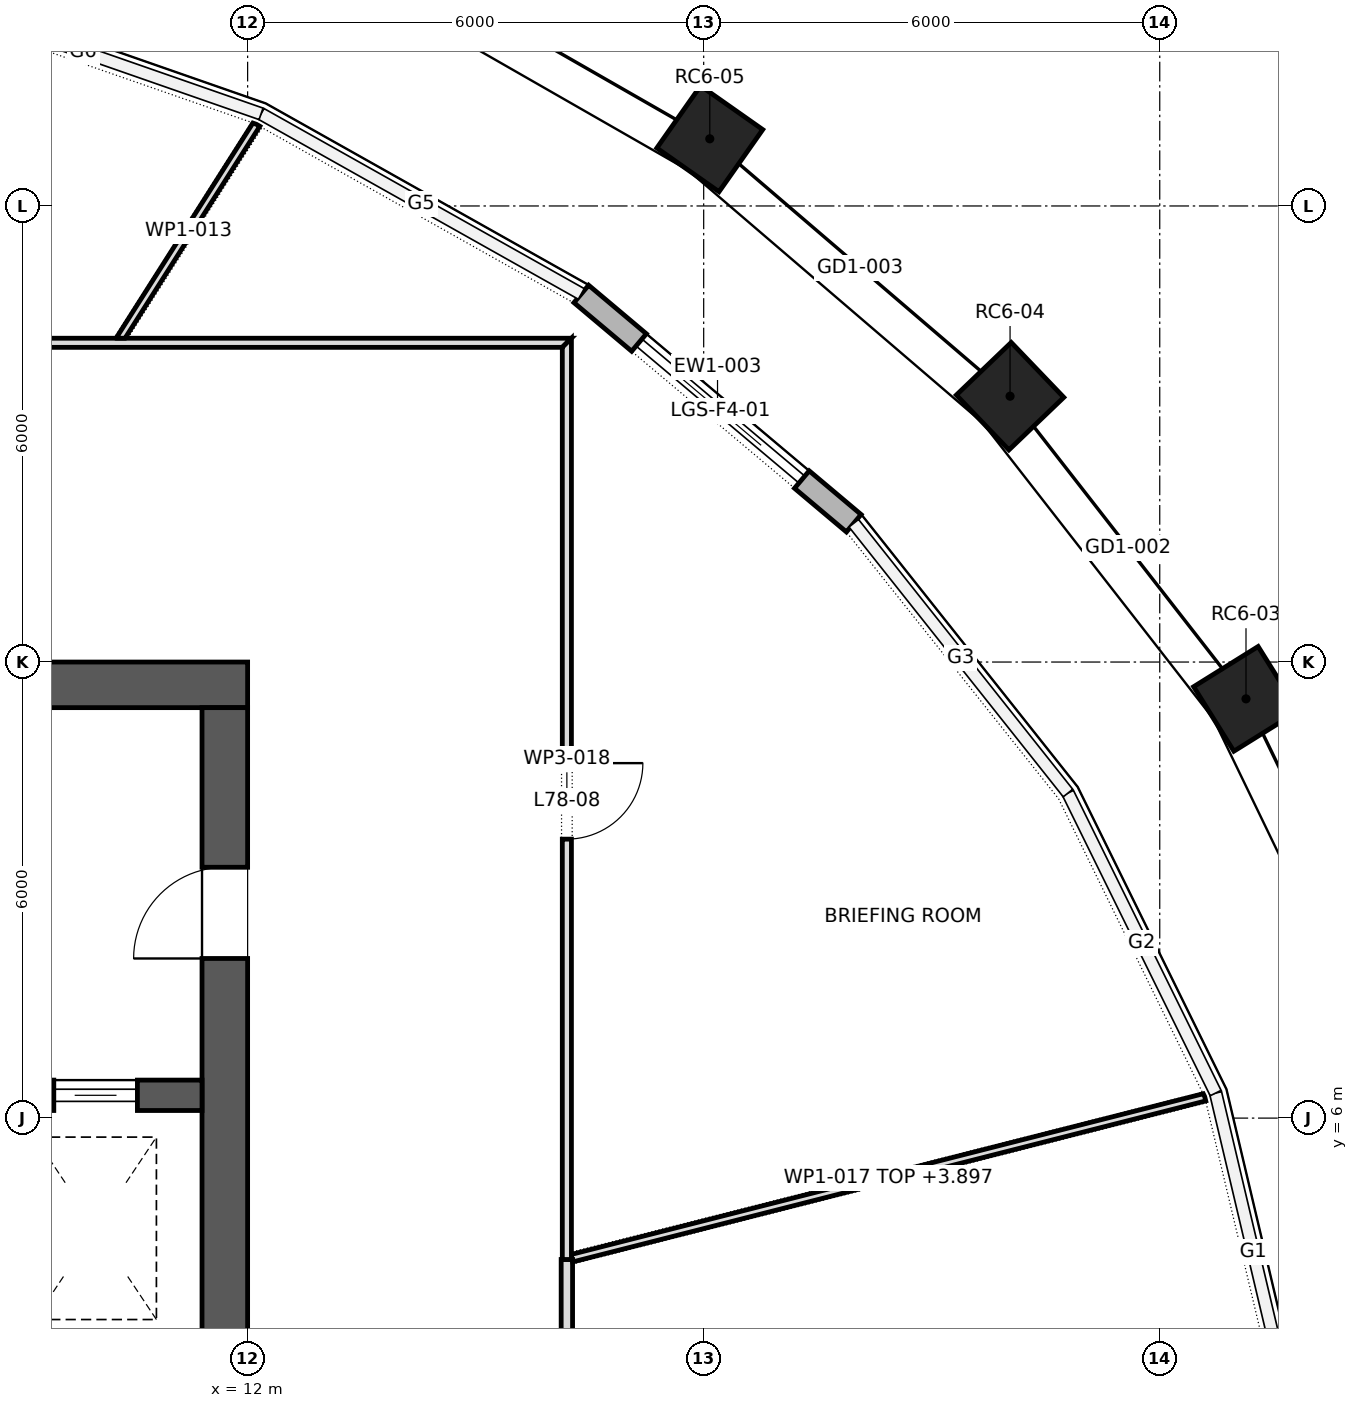
"""IFC4 building model, lengths in metres.
Left out: names, types, materials, properties, quantities, classifications, styles, units other than length and angle.
Written with IfcOpenShell. Run it as: python <this file> out.ifc"""

import sys

from ifc_helpers import new_model, si_unit, direction, frame, frame_2d, origin, origin_2d, place, context, subcontext, project, spatial, polyline, rectangle, outline, extrude, element, fill, save


model = new_model("IFC4")
c1 = context("Model", 3, precision=1e-05, world=origin(), true_north=direction((0.0, 1.0)))
c2 = subcontext(c1, "Body", "Model", "MODEL_VIEW")
j1 = project(units=[si_unit("LENGTHUNIT", "METRE"), si_unit("PLANEANGLEUNIT", "RADIAN")], contexts=[c1])
p1 = place(None, origin())
s1 = spatial("IfcSite", under=j1, at=p1, CompositionType="ELEMENT")
p2 = place(p1, origin())
s2 = spatial("IfcBuilding", under=s1, at=p2, CompositionType="ELEMENT")
p3 = place(p2, frame((0.0, 0.0, 333.3)))
s3 = spatial("IfcBuildingStorey", under=s2, at=p3, CompositionType="ELEMENT", Elevation=333.3)
for number, where, z_axis, x_axis in (
    (1, (25.135, 11.516, 0.0), (0.0, 0.0, 1.0), (-0.529, 0.849, 0.0)),
    (2, (22.031, 15.497, 0.0), (0.0, 0.0, 1.0), (-0.692, 0.722, 0.0)),
    (3, (18.08, 18.884, 0.0), (0.0, 0.0, 1.0), (-0.818, 0.575, 0.0)),
):
    element("IfcColumn", number, at=place(p3, frame(where, z_axis=z_axis, x_axis=x_axis)), inside=s3, PredefinedType="COLUMN", context=c2, shape_type="SweptSolid", body=[
        extrude(rectangle(XDim=1.0, YDim=1.0, at=origin_2d()), origin(), (0.0, 0.0, 1.0), 5.0),
    ])
p4 = place(p3, frame((-12.0, 11.7, 0.0), z_axis=(0.0, 0.0, 1.0), x_axis=(1.0, 0.0, 0.0)))
e4 = element("IfcWall", 4, at=p4, inside=s3, PredefinedType="SHEAR", context=c2, shape_type="SweptSolid", body=[
    extrude(rectangle(XDim=24.0, YDim=0.6, at=frame_2d((12.0, 0.0))), origin(), (0.0, 0.0, 1.0), 5.0),
])
p5 = place(p4, frame((9.025, 0.0, 0.0)))
e5 = element("IfcOpeningElement", 5, at=p5, cuts=e4, PredefinedType="OPENING", context=c2, shape_type="SweptSolid", body=[
    extrude(rectangle(XDim=0.9, YDim=2.1, at=frame_2d((0.45, 1.05))), frame((0.0, 0.312, 0.0), z_axis=(0.0, -1.0, 0.0), x_axis=(1.0, 0.0, 0.0)), (0.0, 0.0, 1.0), 0.624),
])
p6 = place(p4, frame((10.675, 0.0, 0.0)))
e6 = element("IfcOpeningElement", 6, at=p6, cuts=e4, PredefinedType="OPENING", context=c2, shape_type="SweptSolid", body=[
    extrude(rectangle(XDim=0.9, YDim=2.1, at=frame_2d((0.45, 1.05))), frame((0.0, 0.312, 0.0), z_axis=(0.0, -1.0, 0.0), x_axis=(1.0, 0.0, 0.0)), (0.0, 0.0, 1.0), 0.624),
])
p7 = place(p4, frame((4.6, 0.0, 0.0)))
e7 = element("IfcOpeningElement", 7, at=p7, cuts=e4, PredefinedType="OPENING", context=c2, shape_type="SweptSolid", body=[
    extrude(rectangle(XDim=0.8, YDim=2.1, at=frame_2d((0.4, 1.05))), frame((0.0, 0.312, 0.0), z_axis=(0.0, -1.0, 0.0), x_axis=(1.0, 0.0, 0.0)), (0.0, 0.0, 1.0), 0.624),
])
p8 = place(p4, frame((7.0, 0.0, 0.0)))
e8 = element("IfcOpeningElement", 8, at=p8, cuts=e4, PredefinedType="OPENING", context=c2, shape_type="SweptSolid", body=[
    extrude(rectangle(XDim=0.8, YDim=2.1, at=frame_2d((0.4, 1.05))), frame((0.0, 0.312, 0.0), z_axis=(0.0, -1.0, 0.0), x_axis=(1.0, 0.0, 0.0)), (0.0, 0.0, 1.0), 0.624),
])
p9 = place(p4, frame((15.85, 0.0, 0.0)))
e9 = element("IfcOpeningElement", 9, at=p9, cuts=e4, PredefinedType="OPENING", context=c2, shape_type="SweptSolid", body=[
    extrude(rectangle(XDim=0.8, YDim=2.1, at=frame_2d((0.4, 1.05))), frame((0.0, 0.312, 0.0), z_axis=(0.0, -1.0, 0.0), x_axis=(1.0, 0.0, 0.0)), (0.0, 0.0, 1.0), 0.624),
])
p10 = place(p3, frame((11.7, -11.4, 0.0), z_axis=(0.0, 0.0, 1.0), x_axis=(0.0, 1.0, 0.0)))
e10 = element("IfcWall", 10, at=p10, inside=s3, PredefinedType="SHEAR", context=c2, shape_type="SweptSolid", body=[
    extrude(rectangle(XDim=22.8, YDim=0.6, at=frame_2d((11.4, 0.0))), origin(), (0.0, 0.0, 1.0), 5.0),
])
p11 = place(p10, frame((10.2, 0.0, 0.0)))
e11 = element("IfcOpeningElement", 11, at=p11, cuts=e10, PredefinedType="OPENING", context=c2, shape_type="SweptSolid", body=[
    extrude(rectangle(XDim=2.4, YDim=2.1, at=frame_2d((1.2, 1.05))), frame((0.0, 0.312, 0.0), z_axis=(0.0, -1.0, 0.0), x_axis=(1.0, 0.0, 0.0)), (0.0, 0.0, 1.0), 0.624),
])
p12 = place(p10, frame((19.5, 0.0, 0.0)))
e12 = element("IfcOpeningElement", 12, at=p12, cuts=e10, PredefinedType="OPENING", context=c2, shape_type="SweptSolid", body=[
    extrude(rectangle(XDim=1.2, YDim=2.1, at=frame_2d((0.6, 1.05))), frame((0.0, 0.312, 0.0), z_axis=(0.0, -1.0, 0.0), x_axis=(1.0, 0.0, 0.0)), (0.0, 0.0, 1.0), 0.624),
])
p13 = place(p10, frame((2.1, 0.0, 0.0)))
e13 = element("IfcOpeningElement", 13, at=p13, cuts=e10, PredefinedType="OPENING", context=c2, shape_type="SweptSolid", body=[
    extrude(rectangle(XDim=1.2, YDim=2.1, at=frame_2d((0.6, 1.05))), frame((0.0, 0.312, 0.0), z_axis=(0.0, -1.0, 0.0), x_axis=(1.0, 0.0, 0.0)), (0.0, 0.0, 1.0), 0.624),
])
p14 = place(p3, frame((-11.4, 6.3, 0.0), z_axis=(0.0, 0.0, 1.0), x_axis=(1.0, 0.0, 0.0)))
e14 = element("IfcWall", 14, at=p14, inside=s3, PredefinedType="SHEAR", context=c2, shape_type="SweptSolid", body=[
    extrude(rectangle(XDim=22.8, YDim=0.4, at=frame_2d((11.4, 0.0))), origin(), (0.0, 0.0, 1.0), 5.0),
])
p15 = place(p14, frame((20.85, 0.0, 0.0)))
e15 = element("IfcOpeningElement", 15, at=p15, cuts=e14, PredefinedType="OPENING", context=c2, shape_type="SweptSolid", body=[
    extrude(rectangle(XDim=1.1, YDim=2.1, at=frame_2d((0.55, 1.05))), frame((0.0, 0.212, 0.0), z_axis=(0.0, -1.0, 0.0), x_axis=(1.0, 0.0, 0.0)), (0.0, 0.0, 1.0), 0.424),
])
p16 = place(p3, frame((19.975, 13.826, 0.0), z_axis=(0.0, 0.0, 1.0), x_axis=(-0.765128700347, 0.643877373344, 0.0)))
e16 = element("IfcWall", 16, at=p16, inside=s3, PredefinedType="STANDARD", context=c2, shape_type="SweptSolid", body=[
    extrude(outline(polyline([(0.0, -0.15), (4.686, -0.15), (4.686, 0.15), (0.0, 0.15), (0.0, -0.15)])), origin(), (0.0, 0.0, 1.0), 4.65),
])
p17 = place(p16, frame((0.893, 0.0, 0.0)))
e17 = element("IfcOpeningElement", 17, at=p17, cuts=e16, PredefinedType="OPENING", context=c2, shape_type="SweptSolid", body=[
    extrude(rectangle(XDim=2.8, YDim=4.2, at=frame_2d((1.4, 2.1))), frame((0.0, 0.162, 0.0), z_axis=(0.0, -1.0, 0.0), x_axis=(1.0, 0.0, 0.0)), (0.0, 0.0, 1.0), 0.324),
])
p18 = place(p3, frame((-1.9, 16.2, 0.0), z_axis=(0.0, 0.0, 1.0), x_axis=(1.0, 0.0, 0.0)))
e18 = element("IfcWall", 18, at=p18, inside=s3, PredefinedType="PARTITIONING", context=c2, shape_type="SweptSolid", body=[
    extrude(outline(polyline([(0.0, -0.06), (1.804, -0.06), (3.608, -0.06), (5.412, -0.06), (7.216, -0.06), (9.02, -0.06), (10.824, -0.06), (12.628, -0.06), (14.432, -0.06), (16.236, -0.06), (18.04, -0.06), (18.16, 0.06), (16.344, 0.06), (14.528, 0.06), (12.712, 0.06), (10.896, 0.06), (9.08, 0.06), (7.264, 0.06), (5.448, 0.06), (3.632, 0.06), (1.816, 0.06), (0.0, 0.06), (0.0, -0.06)])), origin(), (0.0, 0.0, 1.0), 4.65),
])
p19 = place(p18, frame((5.595, 0.0, 0.0)))
e19 = element("IfcOpeningElement", 19, at=p19, cuts=e18, PredefinedType="OPENING", context=c2, shape_type="SweptSolid", body=[
    extrude(rectangle(XDim=1.0, YDim=2.1, at=frame_2d((0.5, 1.05))), frame((0.0, 0.072, 0.0), z_axis=(0.0, -1.0, 0.0), x_axis=(1.0, 0.0, 0.0)), (0.0, 0.0, 1.0), 0.144),
])
p20 = place(p3, frame((10.311, 16.233, 0.0), z_axis=(0.0, 0.0, 1.0), x_axis=(0.53653775198, 0.843876318367, 0.0)))
e20 = element("IfcWall", 20, at=p20, inside=s3, PredefinedType="PARTITIONING", context=c2, shape_type="SweptSolid", body=[
    extrude(outline(polyline([(3.368, -0.05), (3.368, -0.049), (3.365, 0.002), (3.354, 0.05), (1.677, 0.05), (0.0, 0.05), (0.0, 0.05), (0.063, -0.05), (1.716, -0.05), (3.368, -0.05)])), origin(), (0.0, 0.0, 1.0), 4.65),
])
p21 = place(p3, frame((16.2, -16.275, 0.0), z_axis=(0.0, 0.0, 1.0), x_axis=(0.0, 1.0, 0.0)))
e21 = element("IfcWall", 21, at=p21, inside=s3, PredefinedType="PARTITIONING", context=c2, shape_type="SweptSolid", body=[
    extrude(outline(polyline([(20.415, 0.075), (18.573, 0.075), (16.73, 0.075), (14.888, 0.075), (13.046, 0.075), (11.203, 0.075), (9.361, 0.075), (7.519, 0.075), (5.677, 0.075), (3.834, 0.075), (1.992, 0.075), (0.15, 0.075), (0.0, -0.075), (1.856, -0.075), (3.712, -0.075), (5.568, -0.075), (7.424, -0.075), (9.28, -0.075), (11.135, -0.075), (12.991, -0.075), (14.847, -0.075), (16.703, -0.075), (18.559, -0.075), (20.415, -0.075), (20.415, 0.075)])), origin(), (0.0, 0.0, 1.0), 4.65),
])
p22 = place(p21, frame((5.605, 0.0, 0.0)))
e22 = element("IfcOpeningElement", 22, at=p22, cuts=e21, PredefinedType="OPENING", context=c2, shape_type="SweptSolid", body=[
    extrude(rectangle(XDim=1.0, YDim=2.1, at=frame_2d((0.5, 1.05))), frame((0.0, 0.087, 0.0), z_axis=(0.0, -1.0, 0.0), x_axis=(1.0, 0.0, 0.0)), (0.0, 0.0, 1.0), 0.174),
])
p23 = place(p21, frame((15.775, 0.0, 0.0)))
e23 = element("IfcOpeningElement", 23, at=p23, cuts=e21, PredefinedType="OPENING", context=c2, shape_type="SweptSolid", body=[
    extrude(rectangle(XDim=1.0, YDim=2.1, at=frame_2d((0.5, 1.05))), frame((0.0, 0.087, 0.0), z_axis=(0.0, -1.0, 0.0), x_axis=(1.0, 0.0, 0.0)), (0.0, 0.0, 1.0), 0.174),
])
p24 = place(p3, frame((16.263, 4.156, 0.0), z_axis=(0.0, 0.0, 1.0), x_axis=(0.969153814145, 0.246456658519, 0.0)))
e24 = element("IfcWall", 24, at=p24, inside=s3, PredefinedType="PARTITIONING", context=c2, shape_type="SweptSolid", body=[
    extrude(outline(polyline([(8.595, -0.05), (8.595, 0.009), (8.587, 0.05), (6.871, 0.05), (5.156, 0.05), (3.441, 0.05), (1.725, 0.05), (0.01, 0.05), (0.0, 0.012), (0.0, -0.017), (0.008, -0.019), (0.0, -0.049), (0.0, -0.05), (1.719, -0.05), (3.438, -0.05), (5.157, -0.05), (6.876, -0.05), (8.595, -0.05)])), origin(), (0.0, 0.0, 1.0), 3.897),
])
p25 = place(p3, frame((16.2, 16.26, 0.0), z_axis=(0.0, 0.0, 1.0), x_axis=(0.0, -1.0, 0.0)))
e25 = element("IfcWall", 25, at=p25, inside=s3, PredefinedType="PARTITIONING", context=c2, shape_type="SweptSolid", body=[
    extrude(outline(polyline([(12.12, 0.06), (10.389, 0.06), (8.657, 0.06), (6.926, 0.06), (5.194, 0.06), (3.463, 0.06), (1.731, 0.06), (0.0, 0.06), (0.12, -0.06), (1.834, -0.06), (3.549, -0.06), (5.263, -0.06), (6.977, -0.06), (8.692, -0.06), (10.406, -0.06), (12.12, -0.06), (12.12, 0.06)])), origin(), (0.0, 0.0, 1.0), 4.65),
])
p26 = place(p25, frame((5.59, 0.0, 0.0)))
e26 = element("IfcOpeningElement", 26, at=p26, cuts=e25, PredefinedType="OPENING", context=c2, shape_type="SweptSolid", body=[
    extrude(rectangle(XDim=1.0, YDim=2.1, at=frame_2d((0.5, 1.05))), frame((0.0, 0.072, 0.0), z_axis=(0.0, -1.0, 0.0), x_axis=(1.0, 0.0, 0.0)), (0.0, 0.0, 1.0), 0.144),
])
p27 = place(p17, origin())
e27 = element("IfcDoor", 27, at=p27, inside=s3, OperationType="DOUBLE_DOOR_SLIDING", PredefinedType="DOOR", context=c2, shape_type="SweptSolid", body=[
    extrude(rectangle(XDim=2.8, YDim=4.2, at=frame_2d((1.4, 2.1))), frame((0.0, 0.025, 0.0), z_axis=(0.0, -1.0, 0.0), x_axis=(1.0, 0.0, 0.0)), (0.0, 0.0, 1.0), 0.05),
])
fill(e17, e27)
p28 = place(p15, origin())
e28 = element("IfcDoor", 28, at=p28, inside=s3, OperationType="SLIDING_TO_LEFT", PredefinedType="DOOR", context=c2, shape_type="SweptSolid", body=[
    extrude(rectangle(XDim=1.1, YDim=2.1, at=frame_2d((0.55, 1.05))), frame((0.0, 0.025, 0.0), z_axis=(0.0, -1.0, 0.0), x_axis=(1.0, 0.0, 0.0)), (0.0, 0.0, 1.0), 0.05),
])
fill(e15, e28)
p29 = place(p12, origin())
e29 = element("IfcDoor", 29, at=p29, inside=s3, OperationType="SINGLE_SWING_RIGHT", PredefinedType="DOOR", context=c2, shape_type="SweptSolid", body=[
    extrude(rectangle(XDim=1.2, YDim=2.1, at=frame_2d((0.6, 1.05))), frame((0.0, 0.025, 0.0), z_axis=(0.0, -1.0, 0.0), x_axis=(1.0, 0.0, 0.0)), (0.0, 0.0, 1.0), 0.05),
])
fill(e12, e29)
p30 = place(p26, origin())
e30 = element("IfcDoor", 30, at=p30, inside=s3, OperationType="SINGLE_SWING_RIGHT", PredefinedType="DOOR", context=c2, shape_type="SweptSolid", body=[
    extrude(rectangle(XDim=1.0, YDim=2.1, at=frame_2d((0.5, 1.05))), frame((0.0, 0.025, 0.0), z_axis=(0.0, -1.0, 0.0), x_axis=(1.0, 0.0, 0.0)), (0.0, 0.0, 1.0), 0.05),
])
fill(e26, e30)
save(model, sys.argv[1])
